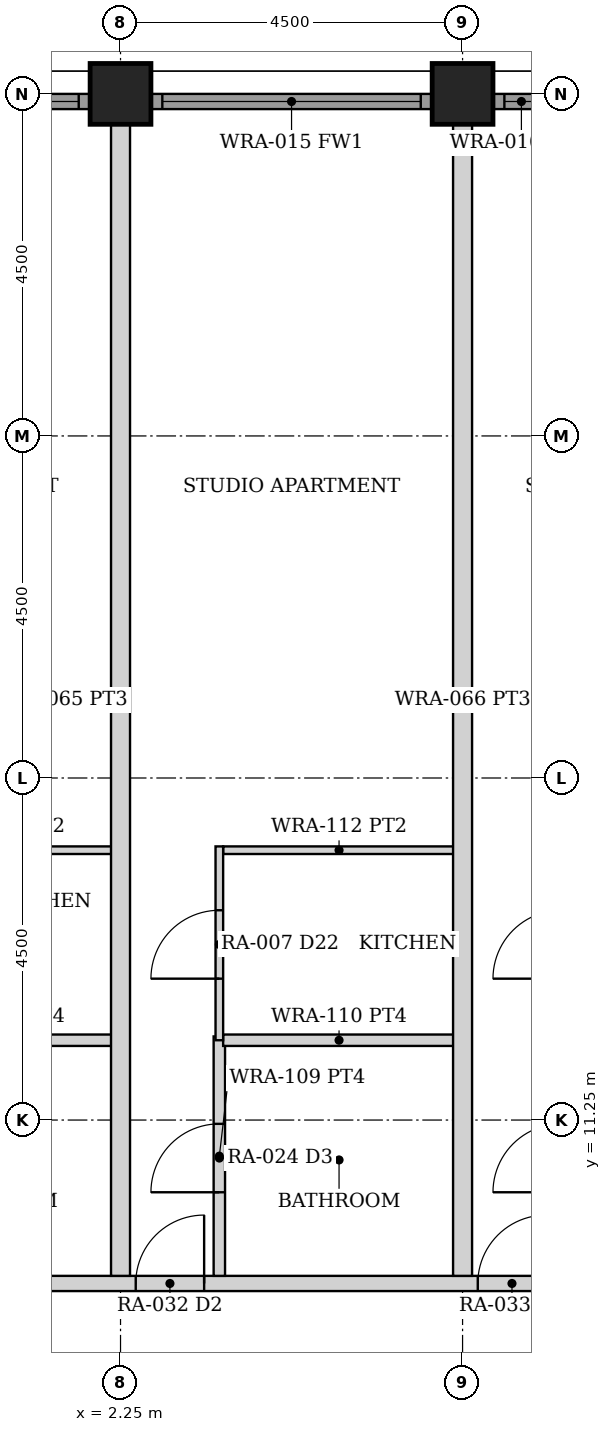
"""IFC4 building model, lengths in metres.
Left out: names, types, materials, properties, quantities, classifications, styles, units other than length and angle.
Written with IfcOpenShell. Run it as: python <this file> out.ifc"""

import sys

from ifc_helpers import new_model, si_unit, direction, frame, frame_2d, origin, origin_2d, place, context, subcontext, project, spatial, rectangle, hollow_rectangle, extrude, element, fill, save


model = new_model("IFC4")
c1 = context("Model", 3, precision=1e-05, world=origin(), true_north=direction((0.0, 1.0)))
c2 = subcontext(c1, "Body", "Model", "MODEL_VIEW")
j1 = project(units=[si_unit("LENGTHUNIT", "METRE"), si_unit("PLANEANGLEUNIT", "RADIAN")], contexts=[c1])
p1 = place(None, origin())
s1 = spatial("IfcSite", under=j1, at=p1, CompositionType="ELEMENT")
p2 = place(p1, origin())
s2 = spatial("IfcBuilding", under=s1, at=p2, CompositionType="ELEMENT")
p3 = place(p2, frame((0.0, 0.0, 30.0)))
s3 = spatial("IfcBuildingStorey", under=s2, at=p3, CompositionType="ELEMENT", Elevation=30.0)
for number, where, z_axis, x_axis in (
    (1, (2.25, 24.75, 0.0), (0.0, 0.0, 1.0), (0.0, 1.0, 0.0)),
    (2, (6.75, 24.75, 0.0), (0.0, 0.0, 1.0), (0.0, 1.0, 0.0)),
):
    element("IfcColumn", number, at=place(p3, frame(where, z_axis=z_axis, x_axis=x_axis)), inside=s3, PredefinedType="COLUMN", context=c2, shape_type="SweptSolid", body=[
        extrude(hollow_rectangle(XDim=0.8, YDim=0.8, WallThickness=0.08, at=origin_2d()), origin(), (0.0, 0.0, 1.0), 3.5),
    ])
p4 = place(p3, frame((-1.845, 24.65, 0.0), z_axis=(0.0, 0.0, 1.0), x_axis=(1.0, 0.0, 0.0)))
e3 = element("IfcWall", 3, at=p4, inside=s3, PredefinedType="SOLIDWALL", context=c2, shape_type="SweptSolid", body=[
    extrude(rectangle(XDim=3.69, YDim=0.2, at=frame_2d((1.845, 0.0))), origin(), (0.0, 0.0, 1.0), 2.379),
])
p5 = place(p4, frame((0.145, 0.0, 0.3)))
e4 = element("IfcOpeningElement", 4, at=p5, cuts=e3, PredefinedType="OPENING", context=c2, shape_type="SweptSolid", body=[
    extrude(rectangle(XDim=3.4, YDim=1.929, at=frame_2d((1.7, 0.964))), frame((0.0, 0.11, 0.0), z_axis=(0.0, -1.0, 0.0), x_axis=(1.0, 0.0, 0.0)), (0.0, 0.0, 1.0), 0.22),
])
p6 = place(p3, frame((2.655, 24.65, 0.0), z_axis=(0.0, 0.0, 1.0), x_axis=(1.0, 0.0, 0.0)))
e5 = element("IfcWall", 5, at=p6, inside=s3, PredefinedType="SOLIDWALL", context=c2, shape_type="SweptSolid", body=[
    extrude(rectangle(XDim=3.69, YDim=0.2, at=frame_2d((1.845, 0.0))), origin(), (0.0, 0.0, 1.0), 2.379),
])
p7 = place(p6, frame((0.145, 0.0, 0.3)))
e6 = element("IfcOpeningElement", 6, at=p7, cuts=e5, PredefinedType="OPENING", context=c2, shape_type="SweptSolid", body=[
    extrude(rectangle(XDim=3.4, YDim=1.929, at=frame_2d((1.7, 0.964))), frame((0.0, 0.11, 0.0), z_axis=(0.0, -1.0, 0.0), x_axis=(1.0, 0.0, 0.0)), (0.0, 0.0, 1.0), 0.22),
])
p8 = place(p3, frame((7.155, 24.65, 0.0), z_axis=(0.0, 0.0, 1.0), x_axis=(1.0, 0.0, 0.0)))
e7 = element("IfcWall", 7, at=p8, inside=s3, PredefinedType="SOLIDWALL", context=c2, shape_type="SweptSolid", body=[
    extrude(rectangle(XDim=3.69, YDim=0.2, at=frame_2d((1.845, 0.0))), origin(), (0.0, 0.0, 1.0), 2.379),
])
p9 = place(p8, frame((0.145, 0.0, 0.3)))
e8 = element("IfcOpeningElement", 8, at=p9, cuts=e7, PredefinedType="OPENING", context=c2, shape_type="SweptSolid", body=[
    extrude(rectangle(XDim=3.4, YDim=1.929, at=frame_2d((1.7, 0.964))), frame((0.0, 0.11, 0.0), z_axis=(0.0, -1.0, 0.0), x_axis=(1.0, 0.0, 0.0)), (0.0, 0.0, 1.0), 0.22),
])
p10 = place(p3, frame((-24.55, 9.1, 0.0), z_axis=(0.0, 0.0, 1.0), x_axis=(1.0, 0.0, 0.0)))
e9 = element("IfcWall", 9, at=p10, inside=s3, PredefinedType="PARTITIONING", context=c2, shape_type="SweptSolid", body=[
    extrude(rectangle(XDim=49.1, YDim=0.2, at=frame_2d((24.55, 0.0))), origin(), (0.0, 0.0, 1.0), 2.373),
])
p11 = place(p10, frame((5.1, 0.0, 0.0)))
e10 = element("IfcOpeningElement", 10, at=p11, cuts=e9, PredefinedType="OPENING", context=c2, shape_type="SweptSolid", body=[
    extrude(rectangle(XDim=0.9, YDim=2.1, at=frame_2d((0.45, 1.05))), frame((0.0, 0.11, 0.0), z_axis=(0.0, -1.0, 0.0), x_axis=(1.0, 0.0, 0.0)), (0.0, 0.0, 1.0), 0.22),
])
p12 = place(p10, frame((9.0, 0.0, 0.0)))
e11 = element("IfcOpeningElement", 11, at=p12, cuts=e9, PredefinedType="OPENING", context=c2, shape_type="SweptSolid", body=[
    extrude(rectangle(XDim=0.9, YDim=2.1, at=frame_2d((0.45, 1.05))), frame((0.0, 0.11, 0.0), z_axis=(0.0, -1.0, 0.0), x_axis=(1.0, 0.0, 0.0)), (0.0, 0.0, 1.0), 0.22),
])
p13 = place(p10, frame((13.5, 0.0, 0.0)))
e12 = element("IfcOpeningElement", 12, at=p13, cuts=e9, PredefinedType="OPENING", context=c2, shape_type="SweptSolid", body=[
    extrude(rectangle(XDim=0.9, YDim=2.1, at=frame_2d((0.45, 1.05))), frame((0.0, 0.11, 0.0), z_axis=(0.0, -1.0, 0.0), x_axis=(1.0, 0.0, 0.0)), (0.0, 0.0, 1.0), 0.22),
])
p14 = place(p10, frame((18.0, 0.0, 0.0)))
e13 = element("IfcOpeningElement", 13, at=p14, cuts=e9, PredefinedType="OPENING", context=c2, shape_type="SweptSolid", body=[
    extrude(rectangle(XDim=0.9, YDim=2.1, at=frame_2d((0.45, 1.05))), frame((0.0, 0.11, 0.0), z_axis=(0.0, -1.0, 0.0), x_axis=(1.0, 0.0, 0.0)), (0.0, 0.0, 1.0), 0.22),
])
p15 = place(p10, frame((22.5, 0.0, 0.0)))
e14 = element("IfcOpeningElement", 14, at=p15, cuts=e9, PredefinedType="OPENING", context=c2, shape_type="SweptSolid", body=[
    extrude(rectangle(XDim=0.9, YDim=2.1, at=frame_2d((0.45, 1.05))), frame((0.0, 0.11, 0.0), z_axis=(0.0, -1.0, 0.0), x_axis=(1.0, 0.0, 0.0)), (0.0, 0.0, 1.0), 0.22),
])
p16 = place(p10, frame((27.0, 0.0, 0.0)))
e15 = element("IfcOpeningElement", 15, at=p16, cuts=e9, PredefinedType="OPENING", context=c2, shape_type="SweptSolid", body=[
    extrude(rectangle(XDim=0.9, YDim=2.1, at=frame_2d((0.45, 1.05))), frame((0.0, 0.11, 0.0), z_axis=(0.0, -1.0, 0.0), x_axis=(1.0, 0.0, 0.0)), (0.0, 0.0, 1.0), 0.22),
])
p17 = place(p10, frame((31.5, 0.0, 0.0)))
e16 = element("IfcOpeningElement", 16, at=p17, cuts=e9, PredefinedType="OPENING", context=c2, shape_type="SweptSolid", body=[
    extrude(rectangle(XDim=0.9, YDim=2.1, at=frame_2d((0.45, 1.05))), frame((0.0, 0.11, 0.0), z_axis=(0.0, -1.0, 0.0), x_axis=(1.0, 0.0, 0.0)), (0.0, 0.0, 1.0), 0.22),
])
p18 = place(p10, frame((36.0, 0.0, 0.0)))
e17 = element("IfcOpeningElement", 17, at=p18, cuts=e9, PredefinedType="OPENING", context=c2, shape_type="SweptSolid", body=[
    extrude(rectangle(XDim=0.9, YDim=2.1, at=frame_2d((0.45, 1.05))), frame((0.0, 0.11, 0.0), z_axis=(0.0, -1.0, 0.0), x_axis=(1.0, 0.0, 0.0)), (0.0, 0.0, 1.0), 0.22),
])
p19 = place(p10, frame((43.1, 0.0, 0.0)))
e18 = element("IfcOpeningElement", 18, at=p19, cuts=e9, PredefinedType="OPENING", context=c2, shape_type="SweptSolid", body=[
    extrude(rectangle(XDim=0.9, YDim=2.1, at=frame_2d((0.45, 1.05))), frame((0.0, 0.11, 0.0), z_axis=(0.0, -1.0, 0.0), x_axis=(1.0, 0.0, 0.0)), (0.0, 0.0, 1.0), 0.22),
])
p20 = place(p3, frame((-0.9, 12.3, 0.0), z_axis=(0.0, 0.0, 1.0), x_axis=(1.0, 0.0, 0.0)))
e19 = element("IfcWall", 19, at=p20, inside=s3, PredefinedType="PARTITIONING", context=c2, shape_type="SweptSolid", body=[
    extrude(rectangle(XDim=3.05, YDim=0.15, at=frame_2d((1.525, 0.0))), origin(), (0.0, 0.0, 1.0), 2.373),
])
p21 = place(p3, frame((-0.9, 14.8, 0.0), z_axis=(0.0, 0.0, 1.0), x_axis=(1.0, 0.0, 0.0)))
e20 = element("IfcWall", 20, at=p21, inside=s3, PredefinedType="PARTITIONING", context=c2, shape_type="SweptSolid", body=[
    extrude(rectangle(XDim=3.05, YDim=0.1, at=frame_2d((1.525, 0.0))), origin(), (0.0, 0.0, 1.0), 2.373),
])
p22 = place(p3, frame((3.55, 9.2, 0.0), z_axis=(0.0, 0.0, 1.0), x_axis=(0.0, 1.0, 0.0)))
e21 = element("IfcWall", 21, at=p22, inside=s3, PredefinedType="PARTITIONING", context=c2, shape_type="SweptSolid", body=[
    extrude(rectangle(XDim=3.15, YDim=0.15, at=frame_2d((1.575, 0.0))), origin(), (0.0, 0.0, 1.0), 2.373),
])
p23 = place(p22, frame((1.1, 0.0, 0.0)))
e22 = element("IfcOpeningElement", 22, at=p23, cuts=e21, PredefinedType="OPENING", context=c2, shape_type="SweptSolid", body=[
    extrude(rectangle(XDim=0.9, YDim=2.1, at=frame_2d((0.45, 1.05))), frame((0.0, 0.085, 0.0), z_axis=(0.0, -1.0, 0.0), x_axis=(1.0, 0.0, 0.0)), (0.0, 0.0, 1.0), 0.17),
])
p24 = place(p3, frame((3.6, 12.3, 0.0), z_axis=(0.0, 0.0, 1.0), x_axis=(1.0, 0.0, 0.0)))
e23 = element("IfcWall", 23, at=p24, inside=s3, PredefinedType="PARTITIONING", context=c2, shape_type="SweptSolid", body=[
    extrude(rectangle(XDim=3.05, YDim=0.15, at=frame_2d((1.525, 0.0))), origin(), (0.0, 0.0, 1.0), 2.373),
])
p25 = place(p3, frame((3.6, 14.8, 0.0), z_axis=(0.0, 0.0, 1.0), x_axis=(1.0, 0.0, 0.0)))
e24 = element("IfcWall", 24, at=p25, inside=s3, PredefinedType="PARTITIONING", context=c2, shape_type="SweptSolid", body=[
    extrude(rectangle(XDim=3.05, YDim=0.1, at=frame_2d((1.525, 0.0))), origin(), (0.0, 0.0, 1.0), 2.373),
])
p26 = place(p3, frame((3.55, 12.3, 0.0), z_axis=(0.0, 0.0, 1.0), x_axis=(0.0, 1.0, 0.0)))
e25 = element("IfcWall", 25, at=p26, inside=s3, PredefinedType="PARTITIONING", context=c2, shape_type="SweptSolid", body=[
    extrude(rectangle(XDim=2.55, YDim=0.1, at=frame_2d((1.275, 0.0))), origin(), (0.0, 0.0, 1.0), 2.373),
])
p27 = place(p26, frame((0.81, 0.0, 0.0)))
e26 = element("IfcOpeningElement", 26, at=p27, cuts=e25, PredefinedType="OPENING", context=c2, shape_type="SweptSolid", body=[
    extrude(rectangle(XDim=0.9, YDim=2.1, at=frame_2d((0.45, 1.05))), frame((0.0, 0.06, 0.0), z_axis=(0.0, -1.0, 0.0), x_axis=(1.0, 0.0, 0.0)), (0.0, 0.0, 1.0), 0.12),
])
for number, where, z_axis, x_axis in (
    (27, (2.25, 9.2, 0.0), (0.0, 0.0, 1.0), (0.0, 1.0, 0.0)),
    (28, (6.75, 9.2, 0.0), (0.0, 0.0, 1.0), (0.0, 1.0, 0.0)),
):
    element("IfcWall", number, at=place(p3, frame(where, z_axis=z_axis, x_axis=x_axis)), inside=s3, PredefinedType="PARTITIONING", context=c2, shape_type="SweptSolid", body=[
        extrude(rectangle(XDim=15.15, YDim=0.25, at=frame_2d((7.575, 0.0))), origin(), (0.0, 0.0, 1.0), 2.373),
    ])
p28 = place(p5, origin())
e29 = element("IfcWindow", 29, at=p28, inside=s3, PartitioningType="SINGLE_PANEL", PredefinedType="WINDOW", context=c2, shape_type="SweptSolid", body=[
    extrude(rectangle(XDim=3.4, YDim=1.929, at=frame_2d((1.7, 0.964))), frame((0.0, 0.03, 0.0), z_axis=(0.0, -1.0, 0.0), x_axis=(1.0, 0.0, 0.0)), (0.0, 0.0, 1.0), 0.06),
])
fill(e4, e29)
p29 = place(p7, origin())
e30 = element("IfcWindow", 30, at=p29, inside=s3, PartitioningType="SINGLE_PANEL", PredefinedType="WINDOW", context=c2, shape_type="SweptSolid", body=[
    extrude(rectangle(XDim=3.4, YDim=1.929, at=frame_2d((1.7, 0.964))), frame((0.0, 0.03, 0.0), z_axis=(0.0, -1.0, 0.0), x_axis=(1.0, 0.0, 0.0)), (0.0, 0.0, 1.0), 0.06),
])
fill(e6, e30)
p30 = place(p9, origin())
e31 = element("IfcWindow", 31, at=p30, inside=s3, PartitioningType="SINGLE_PANEL", PredefinedType="WINDOW", context=c2, shape_type="SweptSolid", body=[
    extrude(rectangle(XDim=3.4, YDim=1.929, at=frame_2d((1.7, 0.964))), frame((0.0, 0.03, 0.0), z_axis=(0.0, -1.0, 0.0), x_axis=(1.0, 0.0, 0.0)), (0.0, 0.0, 1.0), 0.06),
])
fill(e8, e31)
p31 = place(p16, origin())
e32 = element("IfcDoor", 32, at=p31, inside=s3, OperationType="SINGLE_SWING_RIGHT", PredefinedType="DOOR", context=c2, shape_type="SweptSolid", body=[
    extrude(rectangle(XDim=0.9, YDim=2.1, at=frame_2d((0.45, 1.05))), frame((0.0, 0.025, 0.0), z_axis=(0.0, -1.0, 0.0), x_axis=(1.0, 0.0, 0.0)), (0.0, 0.0, 1.0), 0.05),
])
fill(e15, e32)
p32 = place(p23, origin())
e33 = element("IfcDoor", 33, at=p32, inside=s3, OperationType="SINGLE_SWING_LEFT", PredefinedType="DOOR", context=c2, shape_type="SweptSolid", body=[
    extrude(rectangle(XDim=0.9, YDim=2.1, at=frame_2d((0.45, 1.05))), frame((0.0, 0.025, 0.0), z_axis=(0.0, -1.0, 0.0), x_axis=(1.0, 0.0, 0.0)), (0.0, 0.0, 1.0), 0.05),
])
fill(e22, e33)
p33 = place(p27, origin())
e34 = element("IfcDoor", 34, at=p33, inside=s3, OperationType="SINGLE_SWING_LEFT", PredefinedType="DOOR", context=c2, shape_type="SweptSolid", body=[
    extrude(rectangle(XDim=0.9, YDim=2.1, at=frame_2d((0.45, 1.05))), frame((0.0, 0.025, 0.0), z_axis=(0.0, -1.0, 0.0), x_axis=(1.0, 0.0, 0.0)), (0.0, 0.0, 1.0), 0.05),
])
fill(e26, e34)
p34 = place(p17, origin())
e35 = element("IfcDoor", 35, at=p34, inside=s3, OperationType="SINGLE_SWING_RIGHT", PredefinedType="DOOR", context=c2, shape_type="SweptSolid", body=[
    extrude(rectangle(XDim=0.9, YDim=2.1, at=frame_2d((0.45, 1.05))), frame((0.0, 0.025, 0.0), z_axis=(0.0, -1.0, 0.0), x_axis=(1.0, 0.0, 0.0)), (0.0, 0.0, 1.0), 0.05),
])
fill(e16, e35)
save(model, sys.argv[1])
